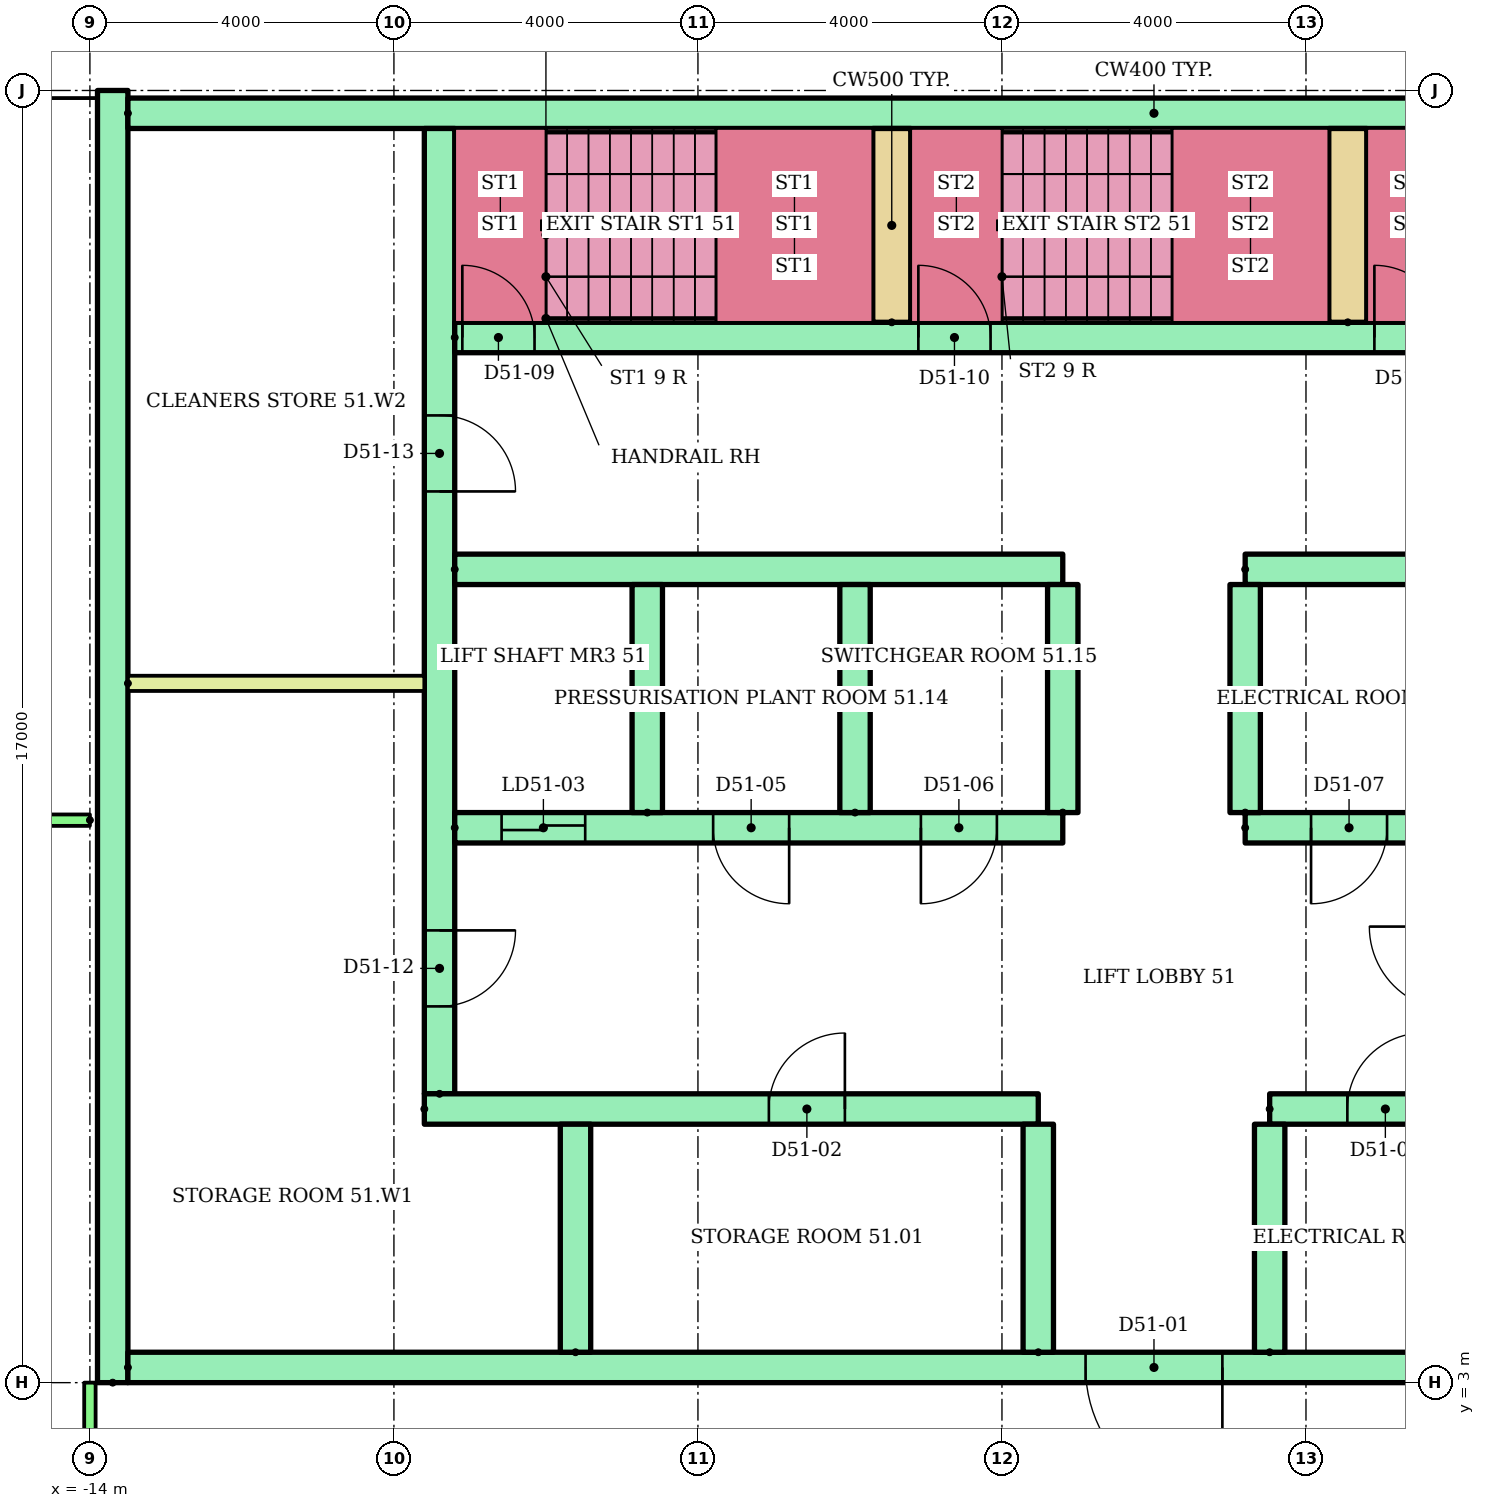
"""IFC4 building model, lengths in metres.
Left out: names, types, materials, properties, quantities, classifications, styles, units other than length and angle.
Written with IfcOpenShell. Run it as: python <this file> out.ifc"""

import sys

from ifc_helpers import new_model, si_unit, direction, frame, frame_2d, origin, place, context, subcontext, project, spatial, rectangle, extrude, element, fill, save


model = new_model("IFC4")
c1 = context("Model", 3, precision=1e-05, world=origin(), true_north=direction((0.0, 1.0)))
c2 = subcontext(c1, "Body", "Model", "MODEL_VIEW")
j1 = project(units=[si_unit("LENGTHUNIT", "METRE"), si_unit("PLANEANGLEUNIT", "RADIAN")], contexts=[c1])
p1 = place(None, origin())
s1 = spatial("IfcSite", under=j1, at=p1, CompositionType="ELEMENT")
p2 = place(p1, origin())
s2 = spatial("IfcBuilding", under=s1, at=p2, CompositionType="ELEMENT")
p3 = place(p2, frame((0.0, 0.0, 194.1)))
s3 = spatial("IfcBuildingStorey", under=s2, at=p3, CompositionType="ELEMENT", Elevation=194.1)
p4 = place(p3, frame((-13.7, 3.0, 0.0), z_axis=(0.0, 0.0, 1.0), x_axis=(0.0, 1.0, 0.0)))
e1 = element("IfcWall", 1, at=p4, inside=s3, PredefinedType="SHEAR", context=c2, shape_type="SweptSolid", body=[
    extrude(rectangle(XDim=17.0, YDim=0.4, at=frame_2d((8.5, 0.0))), origin(), (0.0, 0.0, 1.0), 8.8),
])
p5 = place(p3, frame((-13.5, 19.7, 0.0)))
e2 = element("IfcWall", 2, at=p5, inside=s3, PredefinedType="SHEAR", context=c2, shape_type="SweptSolid", body=[
    extrude(rectangle(XDim=27.0, YDim=0.4, at=frame_2d((13.5, 0.0))), origin(), (0.0, 0.0, 1.0), 8.8),
])
p6 = place(p3, frame((-9.4, 6.8, 0.0), z_axis=(0.0, 0.0, 1.0), x_axis=(0.0, 1.0, 0.0)))
e3 = element("IfcWall", 3, at=p6, inside=s3, PredefinedType="SHEAR", context=c2, shape_type="SweptSolid", body=[
    extrude(rectangle(XDim=12.7, YDim=0.4, at=frame_2d((6.35, 0.0))), origin(), (0.0, 0.0, 1.0), 8.8),
])
p7 = place(p6, frame((1.15, 0.0, 0.0)))
e4 = element("IfcOpeningElement", 4, at=p7, cuts=e3, PredefinedType="OPENING", context=c2, shape_type="SweptSolid", body=[
    extrude(rectangle(XDim=1.0, YDim=2.1, at=frame_2d((0.5, 1.05))), frame((0.0, 0.21, 0.0), z_axis=(0.0, -1.0, 0.0), x_axis=(1.0, 0.0, 0.0)), (0.0, 0.0, 1.0), 0.42),
])
p8 = place(p6, frame((7.925, 0.0, 0.0)))
e5 = element("IfcOpeningElement", 5, at=p8, cuts=e3, PredefinedType="OPENING", context=c2, shape_type="SweptSolid", body=[
    extrude(rectangle(XDim=1.0, YDim=2.1, at=frame_2d((0.5, 1.05))), frame((0.0, 0.21, 0.0), z_axis=(0.0, -1.0, 0.0), x_axis=(1.0, 0.0, 0.0)), (0.0, 0.0, 1.0), 0.42),
])
p9 = place(p3, frame((-13.5, 3.2, 0.0)))
e6 = element("IfcWall", 6, at=p9, inside=s3, PredefinedType="SHEAR", context=c2, shape_type="SweptSolid", body=[
    extrude(rectangle(XDim=27.0, YDim=0.4, at=frame_2d((13.5, 0.0))), origin(), (0.0, 0.0, 1.0), 8.8),
])
p10 = place(p9, frame((22.083, 0.0, 0.0)))
e7 = element("IfcOpeningElement", 7, at=p10, cuts=e6, PredefinedType="OPENING", context=c2, shape_type="SweptSolid", body=[
    extrude(rectangle(XDim=1.1, YDim=2.1, at=frame_2d((0.55, 1.05))), frame((0.0, 0.21, 0.0), z_axis=(0.0, -1.0, 0.0), x_axis=(1.0, 0.0, 0.0)), (0.0, 0.0, 1.0), 0.42),
])
p11 = place(p9, frame((25.128, 0.0, 0.0)))
e8 = element("IfcOpeningElement", 8, at=p11, cuts=e6, PredefinedType="OPENING", context=c2, shape_type="SweptSolid", body=[
    extrude(rectangle(XDim=1.1, YDim=2.1, at=frame_2d((0.55, 1.05))), frame((0.0, 0.21, 0.0), z_axis=(0.0, -1.0, 0.0), x_axis=(1.0, 0.0, 0.0)), (0.0, 0.0, 1.0), 0.42),
])
p12 = place(p9, frame((12.6, 0.0, 0.0)))
e9 = element("IfcOpeningElement", 9, at=p12, cuts=e6, PredefinedType="OPENING", context=c2, shape_type="SweptSolid", body=[
    extrude(rectangle(XDim=1.8, YDim=2.1, at=frame_2d((0.9, 1.05))), frame((0.0, 0.21, 0.0), z_axis=(0.0, -1.0, 0.0), x_axis=(1.0, 0.0, 0.0)), (0.0, 0.0, 1.0), 0.42),
])
p13 = place(p3, frame((-9.6, 6.6, 0.0)))
e10 = element("IfcWall", 10, at=p13, inside=s3, PredefinedType="SHEAR", context=c2, shape_type="SweptSolid", body=[
    extrude(rectangle(XDim=8.078, YDim=0.4, at=frame_2d((4.039, 0.0))), origin(), (0.0, 0.0, 1.0), 8.8),
])
p14 = place(p13, frame((4.533, 0.0, 0.0)))
e11 = element("IfcOpeningElement", 11, at=p14, cuts=e10, PredefinedType="OPENING", context=c2, shape_type="SweptSolid", body=[
    extrude(rectangle(XDim=1.0, YDim=2.1, at=frame_2d((0.5, 1.05))), frame((0.0, 0.21, 0.0), z_axis=(0.0, -1.0, 0.0), x_axis=(1.0, 0.0, 0.0)), (0.0, 0.0, 1.0), 0.42),
])
p15 = place(p3, frame((1.522, 6.6, 0.0)))
e12 = element("IfcWall", 12, at=p15, inside=s3, PredefinedType="SHEAR", context=c2, shape_type="SweptSolid", body=[
    extrude(rectangle(XDim=11.978, YDim=0.4, at=frame_2d((5.989, 0.0))), origin(), (0.0, 0.0, 1.0), 8.8),
])
p16 = place(p15, frame((1.022, 0.0, 0.0)))
e13 = element("IfcOpeningElement", 13, at=p16, cuts=e12, PredefinedType="OPENING", context=c2, shape_type="SweptSolid", body=[
    extrude(rectangle(XDim=1.0, YDim=2.1, at=frame_2d((0.5, 1.05))), frame((0.0, 0.21, 0.0), z_axis=(0.0, -1.0, 0.0), x_axis=(1.0, 0.0, 0.0)), (0.0, 0.0, 1.0), 0.42),
])
p17 = place(p15, frame((4.067, 0.0, 0.0)))
e14 = element("IfcOpeningElement", 14, at=p17, cuts=e12, PredefinedType="OPENING", context=c2, shape_type="SweptSolid", body=[
    extrude(rectangle(XDim=1.0, YDim=2.1, at=frame_2d((0.5, 1.05))), frame((0.0, 0.21, 0.0), z_axis=(0.0, -1.0, 0.0), x_axis=(1.0, 0.0, 0.0)), (0.0, 0.0, 1.0), 0.42),
])
for number, where, z_axis, x_axis in (
    (15, (-7.611, 3.4, 0.0), (0.0, 0.0, 1.0), (0.0, 1.0, 0.0)),
    (16, (-1.522, 3.4, 0.0), (0.0, 0.0, 1.0), (0.0, 1.0, 0.0)),
    (17, (1.522, 3.4, 0.0), (0.0, 0.0, 1.0), (0.0, 1.0, 0.0)),
):
    element("IfcWall", number, at=place(p3, frame(where, z_axis=z_axis, x_axis=x_axis)), inside=s3, PredefinedType="SHEAR", context=c2, shape_type="SweptSolid", body=[
        extrude(rectangle(XDim=3.0, YDim=0.4, at=frame_2d((1.5, 0.0))), origin(), (0.0, 0.0, 1.0), 8.8),
    ])
p18 = place(p3, frame((-9.2, 10.3, 0.0)))
e18 = element("IfcWall", 18, at=p18, inside=s3, PredefinedType="SHEAR", context=c2, shape_type="SweptSolid", body=[
    extrude(rectangle(XDim=8.0, YDim=0.4, at=frame_2d((4.0, 0.0))), origin(), (0.0, 0.0, 1.0), 8.8),
])
p19 = place(p18, frame((0.617, 0.0, 0.0)))
e19 = element("IfcOpeningElement", 19, at=p19, cuts=e18, PredefinedType="OPENING", context=c2, shape_type="SweptSolid", body=[
    extrude(rectangle(XDim=1.1, YDim=2.1, at=frame_2d((0.55, 1.05))), frame((0.0, 0.21, 0.0), z_axis=(0.0, -1.0, 0.0), x_axis=(1.0, 0.0, 0.0)), (0.0, 0.0, 1.0), 0.42),
])
p20 = place(p18, frame((3.4, 0.0, 0.0)))
e20 = element("IfcOpeningElement", 20, at=p20, cuts=e18, PredefinedType="OPENING", context=c2, shape_type="SweptSolid", body=[
    extrude(rectangle(XDim=1.0, YDim=2.1, at=frame_2d((0.5, 1.05))), frame((0.0, 0.21, 0.0), z_axis=(0.0, -1.0, 0.0), x_axis=(1.0, 0.0, 0.0)), (0.0, 0.0, 1.0), 0.42),
])
p21 = place(p18, frame((6.133, 0.0, 0.0)))
e21 = element("IfcOpeningElement", 21, at=p21, cuts=e18, PredefinedType="OPENING", context=c2, shape_type="SweptSolid", body=[
    extrude(rectangle(XDim=1.0, YDim=2.1, at=frame_2d((0.5, 1.05))), frame((0.0, 0.21, 0.0), z_axis=(0.0, -1.0, 0.0), x_axis=(1.0, 0.0, 0.0)), (0.0, 0.0, 1.0), 0.42),
])
p22 = place(p3, frame((-9.2, 13.7, 0.0)))
e22 = element("IfcWall", 22, at=p22, inside=s3, PredefinedType="SHEAR", context=c2, shape_type="SweptSolid", body=[
    extrude(rectangle(XDim=8.0, YDim=0.4, at=frame_2d((4.0, 0.0))), origin(), (0.0, 0.0, 1.0), 8.8),
])
p23 = place(p3, frame((1.2, 10.3, 0.0)))
e23 = element("IfcWall", 23, at=p23, inside=s3, PredefinedType="SHEAR", context=c2, shape_type="SweptSolid", body=[
    extrude(rectangle(XDim=8.0, YDim=0.4, at=frame_2d((4.0, 0.0))), origin(), (0.0, 0.0, 1.0), 8.8),
])
p24 = place(p23, frame((3.55, 0.0, 0.0)))
e24 = element("IfcOpeningElement", 24, at=p24, cuts=e23, PredefinedType="OPENING", context=c2, shape_type="SweptSolid", body=[
    extrude(rectangle(XDim=1.1, YDim=2.1, at=frame_2d((0.55, 1.05))), frame((0.0, 0.21, 0.0), z_axis=(0.0, -1.0, 0.0), x_axis=(1.0, 0.0, 0.0)), (0.0, 0.0, 1.0), 0.42),
])
p25 = place(p23, frame((6.283, 0.0, 0.0)))
e25 = element("IfcOpeningElement", 25, at=p25, cuts=e23, PredefinedType="OPENING", context=c2, shape_type="SweptSolid", body=[
    extrude(rectangle(XDim=1.1, YDim=2.1, at=frame_2d((0.55, 1.05))), frame((0.0, 0.21, 0.0), z_axis=(0.0, -1.0, 0.0), x_axis=(1.0, 0.0, 0.0)), (0.0, 0.0, 1.0), 0.42),
])
p26 = place(p23, frame((0.867, 0.0, 0.0)))
e26 = element("IfcOpeningElement", 26, at=p26, cuts=e23, PredefinedType="OPENING", context=c2, shape_type="SweptSolid", body=[
    extrude(rectangle(XDim=1.0, YDim=2.1, at=frame_2d((0.5, 1.05))), frame((0.0, 0.21, 0.0), z_axis=(0.0, -1.0, 0.0), x_axis=(1.0, 0.0, 0.0)), (0.0, 0.0, 1.0), 0.42),
])
p27 = place(p3, frame((1.2, 13.7, 0.0)))
e27 = element("IfcWall", 27, at=p27, inside=s3, PredefinedType="SHEAR", context=c2, shape_type="SweptSolid", body=[
    extrude(rectangle(XDim=8.0, YDim=0.4, at=frame_2d((4.0, 0.0))), origin(), (0.0, 0.0, 1.0), 8.8),
])
for number, where, z_axis, x_axis in (
    (28, (-6.667, 10.5, 0.0), (0.0, 0.0, 1.0), (0.0, 1.0, 0.0)),
    (29, (-3.933, 10.5, 0.0), (0.0, 0.0, 1.0), (0.0, 1.0, 0.0)),
    (30, (-1.2, 10.5, 0.0), (0.0, 0.0, 1.0), (0.0, 1.0, 0.0)),
    (31, (1.2, 10.5, 0.0), (0.0, 0.0, 1.0), (0.0, 1.0, 0.0)),
):
    element("IfcWall", number, at=place(p3, frame(where, z_axis=z_axis, x_axis=x_axis)), inside=s3, PredefinedType="SHEAR", context=c2, shape_type="SweptSolid", body=[
        extrude(rectangle(XDim=3.0, YDim=0.4, at=frame_2d((1.5, 0.0))), origin(), (0.0, 0.0, 1.0), 8.8),
    ])
p28 = place(p3, frame((-9.2, 16.75, 0.0)))
e32 = element("IfcWall", 32, at=p28, inside=s3, PredefinedType="SHEAR", context=c2, shape_type="SweptSolid", body=[
    extrude(rectangle(XDim=18.4, YDim=0.4, at=frame_2d((9.2, 0.0))), origin(), (0.0, 0.0, 1.0), 8.8),
])
p29 = place(p28, frame((0.1, 0.0, 0.0)))
e33 = element("IfcOpeningElement", 33, at=p29, cuts=e32, PredefinedType="OPENING", context=c2, shape_type="SweptSolid", body=[
    extrude(rectangle(XDim=0.95, YDim=2.1, at=frame_2d((0.475, 1.05))), frame((0.0, 0.21, 0.0), z_axis=(0.0, -1.0, 0.0), x_axis=(1.0, 0.0, 0.0)), (0.0, 0.0, 1.0), 0.42),
])
p30 = place(p28, frame((6.1, 0.0, 0.0)))
e34 = element("IfcOpeningElement", 34, at=p30, cuts=e32, PredefinedType="OPENING", context=c2, shape_type="SweptSolid", body=[
    extrude(rectangle(XDim=0.95, YDim=2.1, at=frame_2d((0.475, 1.05))), frame((0.0, 0.21, 0.0), z_axis=(0.0, -1.0, 0.0), x_axis=(1.0, 0.0, 0.0)), (0.0, 0.0, 1.0), 0.42),
])
p31 = place(p28, frame((12.1, 0.0, 0.0)))
e35 = element("IfcOpeningElement", 35, at=p31, cuts=e32, PredefinedType="OPENING", context=c2, shape_type="SweptSolid", body=[
    extrude(rectangle(XDim=0.95, YDim=2.1, at=frame_2d((0.475, 1.05))), frame((0.0, 0.21, 0.0), z_axis=(0.0, -1.0, 0.0), x_axis=(1.0, 0.0, 0.0)), (0.0, 0.0, 1.0), 0.42),
])
for number, where, z_axis, x_axis in (
    (36, (-3.45, 16.95, 0.0), (0.0, 0.0, 1.0), (0.0, 1.0, 0.0)),
    (37, (2.55, 16.95, 0.0), (0.0, 0.0, 1.0), (0.0, 1.0, 0.0)),
):
    element("IfcWall", number, at=place(p3, frame(where, z_axis=z_axis, x_axis=x_axis)), inside=s3, PredefinedType="SHEAR", context=c2, shape_type="SweptSolid", body=[
        extrude(rectangle(XDim=2.55, YDim=0.5, at=frame_2d((1.275, 0.0))), origin(), (0.0, 0.0, 1.0), 8.8),
    ])
p32 = place(p3, frame((-13.5, 12.2, 0.0)))
e38 = element("IfcWall", 38, at=p32, inside=s3, PredefinedType="PARTITIONING", context=c2, shape_type="SweptSolid", body=[
    extrude(rectangle(XDim=3.9, YDim=0.2, at=frame_2d((1.95, 0.0))), origin(), (0.0, 0.0, 1.0), 8.8),
])
p33 = place(p3, frame((-14.0, 10.4, 0.0), z_axis=(0.0, 0.0, 1.0), x_axis=(-1.0, 0.0, 0.0)))
e39 = element("IfcWall", 39, at=p33, inside=s3, PredefinedType="PARTITIONING", context=c2, shape_type="SweptSolid", body=[
    extrude(rectangle(XDim=8.0, YDim=0.15, at=frame_2d((4.0, 0.0))), origin(), (0.0, 0.0, 1.0), 8.8),
])
p34 = place(p3, frame((-14.0, 1.4, 0.0), z_axis=(0.0, 0.0, 1.0), x_axis=(0.0, 1.0, 0.0)))
e40 = element("IfcWall", 40, at=p34, inside=s3, PredefinedType="PARTITIONING", context=c2, shape_type="SweptSolid", body=[
    extrude(rectangle(XDim=1.6, YDim=0.15, at=frame_2d((0.8, 0.0))), origin(), (0.0, 0.0, 1.0), 8.8),
])
p35 = place(p12, frame((1.8, 0.0, 0.0), z_axis=(0.0, 0.0, 1.0), x_axis=(-1.0, 0.0, 0.0)))
e41 = element("IfcDoor", 41, at=p35, inside=s3, OperationType="DOUBLE_DOOR_SINGLE_SWING", PredefinedType="DOOR", context=c2, shape_type="SweptSolid", body=[
    extrude(rectangle(XDim=1.8, YDim=2.1, at=frame_2d((0.9, 1.05))), frame((0.0, 0.025, 0.0), z_axis=(0.0, -1.0, 0.0), x_axis=(1.0, 0.0, 0.0)), (0.0, 0.0, 1.0), 0.05),
])
fill(e9, e41)
p36 = place(p14, origin())
e42 = element("IfcDoor", 42, at=p36, inside=s3, OperationType="SINGLE_SWING_RIGHT", PredefinedType="DOOR", context=c2, shape_type="SweptSolid", body=[
    extrude(rectangle(XDim=1.0, YDim=2.1, at=frame_2d((0.5, 1.05))), frame((0.0, 0.025, 0.0), z_axis=(0.0, -1.0, 0.0), x_axis=(1.0, 0.0, 0.0)), (0.0, 0.0, 1.0), 0.05),
])
fill(e11, e42)
p37 = place(p16, origin())
e43 = element("IfcDoor", 43, at=p37, inside=s3, OperationType="SINGLE_SWING_RIGHT", PredefinedType="DOOR", context=c2, shape_type="SweptSolid", body=[
    extrude(rectangle(XDim=1.0, YDim=2.1, at=frame_2d((0.5, 1.05))), frame((0.0, 0.025, 0.0), z_axis=(0.0, -1.0, 0.0), x_axis=(1.0, 0.0, 0.0)), (0.0, 0.0, 1.0), 0.05),
])
fill(e13, e43)
p38 = place(p19, origin())
e44 = element("IfcDoor", 44, at=p38, inside=s3, OperationType="SLIDING_TO_LEFT", PredefinedType="DOOR", context=c2, shape_type="SweptSolid", body=[
    extrude(rectangle(XDim=1.1, YDim=2.1, at=frame_2d((0.55, 1.05))), frame((0.0, 0.025, 0.0), z_axis=(0.0, -1.0, 0.0), x_axis=(1.0, 0.0, 0.0)), (0.0, 0.0, 1.0), 0.05),
])
fill(e19, e44)
p39 = place(p20, frame((1.0, 0.0, 0.0), z_axis=(0.0, 0.0, 1.0), x_axis=(-1.0, 0.0, 0.0)))
e45 = element("IfcDoor", 45, at=p39, inside=s3, OperationType="SINGLE_SWING_RIGHT", PredefinedType="DOOR", context=c2, shape_type="SweptSolid", body=[
    extrude(rectangle(XDim=1.0, YDim=2.1, at=frame_2d((0.5, 1.05))), frame((0.0, 0.025, 0.0), z_axis=(0.0, -1.0, 0.0), x_axis=(1.0, 0.0, 0.0)), (0.0, 0.0, 1.0), 0.05),
])
fill(e20, e45)
p40 = place(p21, frame((1.0, 0.0, 0.0), z_axis=(0.0, 0.0, 1.0), x_axis=(-1.0, 0.0, 0.0)))
e46 = element("IfcDoor", 46, at=p40, inside=s3, OperationType="SINGLE_SWING_LEFT", PredefinedType="DOOR", context=c2, shape_type="SweptSolid", body=[
    extrude(rectangle(XDim=1.0, YDim=2.1, at=frame_2d((0.5, 1.05))), frame((0.0, 0.025, 0.0), z_axis=(0.0, -1.0, 0.0), x_axis=(1.0, 0.0, 0.0)), (0.0, 0.0, 1.0), 0.05),
])
fill(e21, e46)
p41 = place(p26, frame((1.0, 0.0, 0.0), z_axis=(0.0, 0.0, 1.0), x_axis=(-1.0, 0.0, 0.0)))
e47 = element("IfcDoor", 47, at=p41, inside=s3, OperationType="SINGLE_SWING_LEFT", PredefinedType="DOOR", context=c2, shape_type="SweptSolid", body=[
    extrude(rectangle(XDim=1.0, YDim=2.1, at=frame_2d((0.5, 1.05))), frame((0.0, 0.025, 0.0), z_axis=(0.0, -1.0, 0.0), x_axis=(1.0, 0.0, 0.0)), (0.0, 0.0, 1.0), 0.05),
])
fill(e26, e47)
p42 = place(p29, origin())
e48 = element("IfcDoor", 48, at=p42, inside=s3, OperationType="SINGLE_SWING_LEFT", PredefinedType="DOOR", context=c2, shape_type="SweptSolid", body=[
    extrude(rectangle(XDim=0.95, YDim=2.1, at=frame_2d((0.475, 1.05))), frame((0.0, 0.025, 0.0), z_axis=(0.0, -1.0, 0.0), x_axis=(1.0, 0.0, 0.0)), (0.0, 0.0, 1.0), 0.05),
])
fill(e33, e48)
p43 = place(p30, origin())
e49 = element("IfcDoor", 49, at=p43, inside=s3, OperationType="SINGLE_SWING_LEFT", PredefinedType="DOOR", context=c2, shape_type="SweptSolid", body=[
    extrude(rectangle(XDim=0.95, YDim=2.1, at=frame_2d((0.475, 1.05))), frame((0.0, 0.025, 0.0), z_axis=(0.0, -1.0, 0.0), x_axis=(1.0, 0.0, 0.0)), (0.0, 0.0, 1.0), 0.05),
])
fill(e34, e49)
p44 = place(p31, origin())
e50 = element("IfcDoor", 50, at=p44, inside=s3, OperationType="SINGLE_SWING_LEFT", PredefinedType="DOOR", context=c2, shape_type="SweptSolid", body=[
    extrude(rectangle(XDim=0.95, YDim=2.1, at=frame_2d((0.475, 1.05))), frame((0.0, 0.025, 0.0), z_axis=(0.0, -1.0, 0.0), x_axis=(1.0, 0.0, 0.0)), (0.0, 0.0, 1.0), 0.05),
])
fill(e35, e50)
p45 = place(p7, frame((1.0, 0.0, 0.0), z_axis=(0.0, 0.0, 1.0), x_axis=(-1.0, 0.0, 0.0)))
e51 = element("IfcDoor", 51, at=p45, inside=s3, OperationType="SINGLE_SWING_RIGHT", PredefinedType="DOOR", context=c2, shape_type="SweptSolid", body=[
    extrude(rectangle(XDim=1.0, YDim=2.1, at=frame_2d((0.5, 1.05))), frame((0.0, 0.025, 0.0), z_axis=(0.0, -1.0, 0.0), x_axis=(1.0, 0.0, 0.0)), (0.0, 0.0, 1.0), 0.05),
])
fill(e4, e51)
p46 = place(p8, frame((1.0, 0.0, 0.0), z_axis=(0.0, 0.0, 1.0), x_axis=(-1.0, 0.0, 0.0)))
e52 = element("IfcDoor", 52, at=p46, inside=s3, OperationType="SINGLE_SWING_LEFT", PredefinedType="DOOR", context=c2, shape_type="SweptSolid", body=[
    extrude(rectangle(XDim=1.0, YDim=2.1, at=frame_2d((0.5, 1.05))), frame((0.0, 0.025, 0.0), z_axis=(0.0, -1.0, 0.0), x_axis=(1.0, 0.0, 0.0)), (0.0, 0.0, 1.0), 0.05),
])
fill(e5, e52)
save(model, sys.argv[1])
